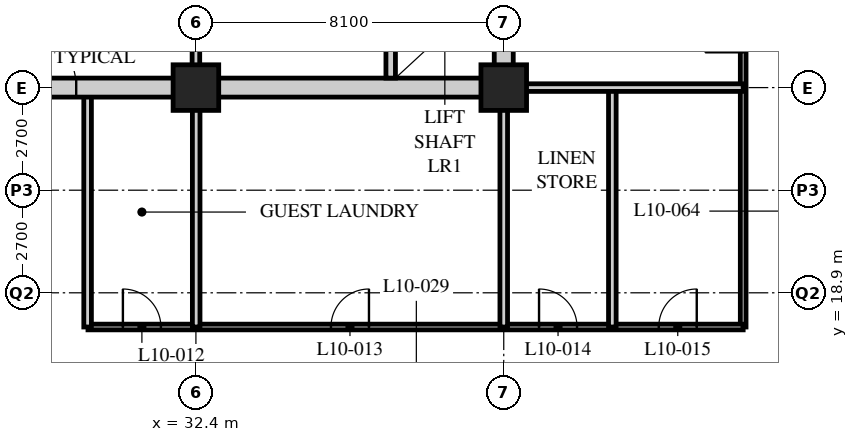
"""IFC4 building model, lengths in metres.
Left out: names, types, materials, properties, quantities, classifications, styles, units other than length and angle.
Written with IfcOpenShell. Run it as: python <this file> out.ifc"""

import sys

from ifc_helpers import new_model, si_unit, direction, frame, frame_2d, origin, origin_2d, place, context, subcontext, project, spatial, rectangle, hollow_rectangle, extrude, element, fill, save


model = new_model("IFC4")
c1 = context("Model", 3, precision=1e-05, world=origin(), true_north=direction((0.0, 1.0)))
c2 = subcontext(c1, "Body", "Model", "MODEL_VIEW")
j1 = project(units=[si_unit("LENGTHUNIT", "METRE"), si_unit("PLANEANGLEUNIT", "RADIAN")], contexts=[c1])
p1 = place(None, origin())
s1 = spatial("IfcSite", under=j1, at=p1, CompositionType="ELEMENT")
p2 = place(p1, origin())
s2 = spatial("IfcBuilding", under=s1, at=p2, CompositionType="ELEMENT")
p3 = place(p2, frame((0.0, 0.0, 46.6)))
s3 = spatial("IfcBuildingStorey", under=s2, at=p3, CompositionType="ELEMENT", Elevation=46.6)
for number, where, z_axis, x_axis in (
    (1, (32.4, 24.3, 0.0), (0.0, 0.0, 1.0), (1.0, 0.0, 0.0)),
    (2, (40.5, 24.3, 0.0), (0.0, 0.0, 1.0), (1.0, 0.0, 0.0)),
):
    element("IfcColumn", number, at=place(p3, frame(where, z_axis=z_axis, x_axis=x_axis)), inside=s3, PredefinedType="COLUMN", context=c2, shape_type="SweptSolid", body=[
        extrude(hollow_rectangle(XDim=1.2, YDim=1.2, WallThickness=0.12, at=origin_2d()), origin(), (0.0, 0.0, 1.0), 3.4),
    ])
p4 = place(p3, frame((46.8, 18.0, 0.0), z_axis=(0.0, 0.0, 1.0), x_axis=(0.0, 1.0, 0.0)))
e3 = element("IfcWall", 3, at=p4, inside=s3, PredefinedType="PARTITIONING", context=c2, shape_type="SweptSolid", body=[
    extrude(rectangle(XDim=22.5, YDim=0.15, at=frame_2d((11.25, 0.0))), origin(), (0.0, 0.0, 1.0), 3.19),
])
p5 = place(p4, frame((7.229, 0.0, 0.0)))
e4 = element("IfcOpeningElement", 4, at=p5, cuts=e3, PredefinedType="OPENING", context=c2, shape_type="SweptSolid", body=[
    extrude(rectangle(XDim=1.0, YDim=2.1, at=frame_2d((0.5, 1.05))), frame((0.0, 0.085, 0.0), z_axis=(0.0, -1.0, 0.0), x_axis=(1.0, 0.0, 0.0)), (0.0, 0.0, 1.0), 0.17),
])
p6 = place(p4, frame((11.279, 0.0, 0.0)))
e5 = element("IfcOpeningElement", 5, at=p6, cuts=e3, PredefinedType="OPENING", context=c2, shape_type="SweptSolid", body=[
    extrude(rectangle(XDim=1.0, YDim=2.1, at=frame_2d((0.5, 1.05))), frame((0.0, 0.085, 0.0), z_axis=(0.0, -1.0, 0.0), x_axis=(1.0, 0.0, 0.0)), (0.0, 0.0, 1.0), 0.17),
])
p7 = place(p4, frame((17.95, 0.0, 0.0)))
e6 = element("IfcOpeningElement", 6, at=p7, cuts=e3, PredefinedType="OPENING", context=c2, shape_type="SweptSolid", body=[
    extrude(rectangle(XDim=1.0, YDim=2.1, at=frame_2d((0.5, 1.05))), frame((0.0, 0.085, 0.0), z_axis=(0.0, -1.0, 0.0), x_axis=(1.0, 0.0, 0.0)), (0.0, 0.0, 1.0), 0.17),
])
p8 = place(p3, frame((29.56, 18.0, 0.0), z_axis=(0.0, 0.0, 1.0), x_axis=(1.0, 0.0, 0.0)))
e7 = element("IfcWall", 7, at=p8, inside=s3, PredefinedType="PARTITIONING", context=c2, shape_type="SweptSolid", body=[
    extrude(rectangle(XDim=17.24, YDim=0.15, at=frame_2d((8.62, 0.0))), origin(), (0.0, 0.0, 1.0), 3.19),
])
p9 = place(p8, frame((0.919, 0.0, 0.0)))
e8 = element("IfcOpeningElement", 8, at=p9, cuts=e7, PredefinedType="OPENING", context=c2, shape_type="SweptSolid", body=[
    extrude(rectangle(XDim=1.0, YDim=2.1, at=frame_2d((0.5, 1.05))), frame((0.0, 0.085, 0.0), z_axis=(0.0, -1.0, 0.0), x_axis=(1.0, 0.0, 0.0)), (0.0, 0.0, 1.0), 0.17),
])
p10 = place(p8, frame((6.394, 0.0, 0.0)))
e9 = element("IfcOpeningElement", 9, at=p10, cuts=e7, PredefinedType="OPENING", context=c2, shape_type="SweptSolid", body=[
    extrude(rectangle(XDim=1.0, YDim=2.1, at=frame_2d((0.5, 1.05))), frame((0.0, 0.085, 0.0), z_axis=(0.0, -1.0, 0.0), x_axis=(1.0, 0.0, 0.0)), (0.0, 0.0, 1.0), 0.17),
])
p11 = place(p8, frame((11.869, 0.0, 0.0)))
e10 = element("IfcOpeningElement", 10, at=p11, cuts=e7, PredefinedType="OPENING", context=c2, shape_type="SweptSolid", body=[
    extrude(rectangle(XDim=1.0, YDim=2.1, at=frame_2d((0.5, 1.05))), frame((0.0, 0.085, 0.0), z_axis=(0.0, -1.0, 0.0), x_axis=(1.0, 0.0, 0.0)), (0.0, 0.0, 1.0), 0.17),
])
p12 = place(p8, frame((15.019, 0.0, 0.0)))
e11 = element("IfcOpeningElement", 11, at=p12, cuts=e7, PredefinedType="OPENING", context=c2, shape_type="SweptSolid", body=[
    extrude(rectangle(XDim=1.0, YDim=2.1, at=frame_2d((0.5, 1.05))), frame((0.0, 0.085, 0.0), z_axis=(0.0, -1.0, 0.0), x_axis=(1.0, 0.0, 0.0)), (0.0, 0.0, 1.0), 0.17),
])
for number, where, z_axis, x_axis in (
    (12, (40.5, 18.0, 0.0), (0.0, 0.0, 1.0), (0.0, 1.0, 0.0)),
    (13, (32.407, 18.0, 0.0), (0.0, 0.0, 1.0), (0.0, 1.0, 0.0)),
):
    element("IfcWall", number, at=place(p3, frame(where, z_axis=z_axis, x_axis=x_axis)), inside=s3, PredefinedType="SOLIDWALL", context=c2, shape_type="SweptSolid", body=[
        extrude(rectangle(XDim=6.3, YDim=0.2, at=frame_2d((3.15, 0.0))), origin(), (0.0, 0.0, 1.0), 2.578),
    ])
for number, where, z_axis, x_axis in (
    (14, (43.357, 18.0, 0.0), (0.0, 0.0, 1.0), (0.0, 1.0, 0.0)),
    (15, (29.55, 18.0, 0.0), (0.0, 0.0, 1.0), (0.0, 1.0, 0.0)),
):
    element("IfcWall", number, at=place(p3, frame(where, z_axis=z_axis, x_axis=x_axis)), inside=s3, PredefinedType="SOLIDWALL", context=c2, shape_type="SweptSolid", body=[
        extrude(rectangle(XDim=6.3, YDim=0.2, at=frame_2d((3.15, 0.0))), origin(), (0.0, 0.0, 1.0), 3.19),
    ])
p13 = place(p3, frame((40.5, 24.3, 0.0), z_axis=(0.0, 0.0, 1.0), x_axis=(1.0, 0.0, 0.0)))
e16 = element("IfcWall", 16, at=p13, inside=s3, PredefinedType="SOLIDWALL", context=c2, shape_type="SweptSolid", body=[
    extrude(rectangle(XDim=6.3, YDim=0.2, at=frame_2d((3.15, 0.0))), origin(), (0.0, 0.0, 1.0), 2.578),
])
p14 = place(p3, frame((15.95, 24.3, 0.0), z_axis=(0.0, 0.0, 1.0), x_axis=(1.0, 0.0, 0.0)))
e17 = element("IfcWall", 17, at=p14, inside=s3, PredefinedType="SOLIDWALL", context=c2, shape_type="SweptSolid", body=[
    extrude(rectangle(XDim=24.8, YDim=0.5, at=frame_2d((12.4, 0.0))), origin(), (0.0, 0.0, 1.0), 2.54),
])
p15 = place(p14, frame((11.5, 0.0, 0.0)))
e18 = element("IfcOpeningElement", 18, at=p15, cuts=e17, PredefinedType="OPENING", context=c2, shape_type="SweptSolid", body=[
    extrude(rectangle(XDim=1.8, YDim=2.4, at=frame_2d((0.9, 1.2))), frame((0.0, 0.26, 0.0), z_axis=(0.0, -1.0, 0.0), x_axis=(1.0, 0.0, 0.0)), (0.0, 0.0, 1.0), 0.52),
])
p16 = place(p3, frame((40.5, 24.55, 0.0), z_axis=(0.0, 0.0, 1.0), x_axis=(0.0, 1.0, 0.0)))
e19 = element("IfcWall", 19, at=p16, inside=s3, PredefinedType="SOLIDWALL", context=c2, shape_type="SweptSolid", body=[
    extrude(rectangle(XDim=15.7, YDim=0.5, at=frame_2d((7.85, 0.0))), origin(), (0.0, 0.0, 1.0), 2.578),
])
p17 = place(p3, frame((37.525, 24.55, 0.0), z_axis=(0.0, 0.0, 1.0), x_axis=(0.0, 1.0, 0.0)))
e20 = element("IfcWall", 20, at=p17, inside=s3, PredefinedType="SOLIDWALL", context=c2, shape_type="SweptSolid", body=[
    extrude(rectangle(XDim=7.75, YDim=0.25, at=frame_2d((3.875, 0.0))), origin(), (0.0, 0.0, 1.0), 3.19),
])
p18 = place(p3, frame((32.4, 24.55, 0.0), z_axis=(0.0, 0.0, 1.0), x_axis=(0.0, 1.0, 0.0)))
e21 = element("IfcWall", 21, at=p18, inside=s3, PredefinedType="PARTITIONING", context=c2, shape_type="SweptSolid", body=[
    extrude(rectangle(XDim=7.75, YDim=0.2, at=frame_2d((3.875, 0.0))), origin(), (0.0, 0.0, 1.0), 2.578),
])
p19 = place(p18, frame((1.4, 0.0, 0.0)))
e22 = element("IfcOpeningElement", 22, at=p19, cuts=e21, PredefinedType="OPENING", context=c2, shape_type="SweptSolid", body=[
    extrude(rectangle(XDim=0.9, YDim=2.1, at=frame_2d((0.45, 1.05))), frame((0.0, 0.11, 0.0), z_axis=(0.0, -1.0, 0.0), x_axis=(1.0, 0.0, 0.0)), (0.0, 0.0, 1.0), 0.22),
])
p20 = place(p18, frame((5.35, 0.0, 0.0)))
e23 = element("IfcOpeningElement", 23, at=p20, cuts=e21, PredefinedType="OPENING", context=c2, shape_type="SweptSolid", body=[
    extrude(rectangle(XDim=0.9, YDim=2.1, at=frame_2d((0.45, 1.05))), frame((0.0, 0.11, 0.0), z_axis=(0.0, -1.0, 0.0), x_axis=(1.0, 0.0, 0.0)), (0.0, 0.0, 1.0), 0.22),
])
p21 = place(p9, origin())
e24 = element("IfcDoor", 24, at=p21, inside=s3, OperationType="SINGLE_SWING_LEFT", PredefinedType="DOOR", context=c2, shape_type="SweptSolid", body=[
    extrude(rectangle(XDim=1.0, YDim=2.1, at=frame_2d((0.5, 1.05))), frame((0.0, 0.025, 0.0), z_axis=(0.0, -1.0, 0.0), x_axis=(1.0, 0.0, 0.0)), (0.0, 0.0, 1.0), 0.05),
])
fill(e8, e24)
p22 = place(p10, origin())
e25 = element("IfcDoor", 25, at=p22, inside=s3, OperationType="SINGLE_SWING_RIGHT", PredefinedType="DOOR", context=c2, shape_type="SweptSolid", body=[
    extrude(rectangle(XDim=1.0, YDim=2.1, at=frame_2d((0.5, 1.05))), frame((0.0, 0.025, 0.0), z_axis=(0.0, -1.0, 0.0), x_axis=(1.0, 0.0, 0.0)), (0.0, 0.0, 1.0), 0.05),
])
fill(e9, e25)
p23 = place(p11, origin())
e26 = element("IfcDoor", 26, at=p23, inside=s3, OperationType="SINGLE_SWING_LEFT", PredefinedType="DOOR", context=c2, shape_type="SweptSolid", body=[
    extrude(rectangle(XDim=1.0, YDim=2.1, at=frame_2d((0.5, 1.05))), frame((0.0, 0.025, 0.0), z_axis=(0.0, -1.0, 0.0), x_axis=(1.0, 0.0, 0.0)), (0.0, 0.0, 1.0), 0.05),
])
fill(e10, e26)
p24 = place(p12, origin())
e27 = element("IfcDoor", 27, at=p24, inside=s3, OperationType="SINGLE_SWING_RIGHT", PredefinedType="DOOR", context=c2, shape_type="SweptSolid", body=[
    extrude(rectangle(XDim=1.0, YDim=2.1, at=frame_2d((0.5, 1.05))), frame((0.0, 0.025, 0.0), z_axis=(0.0, -1.0, 0.0), x_axis=(1.0, 0.0, 0.0)), (0.0, 0.0, 1.0), 0.05),
])
fill(e11, e27)
p25 = place(p15, origin())
e28 = element("IfcDoor", 28, at=p25, inside=s3, OperationType="DOUBLE_DOOR_SINGLE_SWING", PredefinedType="DOOR", context=c2, shape_type="SweptSolid", body=[
    extrude(rectangle(XDim=1.8, YDim=2.4, at=frame_2d((0.9, 1.2))), frame((0.0, 0.025, 0.0), z_axis=(0.0, -1.0, 0.0), x_axis=(1.0, 0.0, 0.0)), (0.0, 0.0, 1.0), 0.05),
])
fill(e18, e28)
save(model, sys.argv[1])
